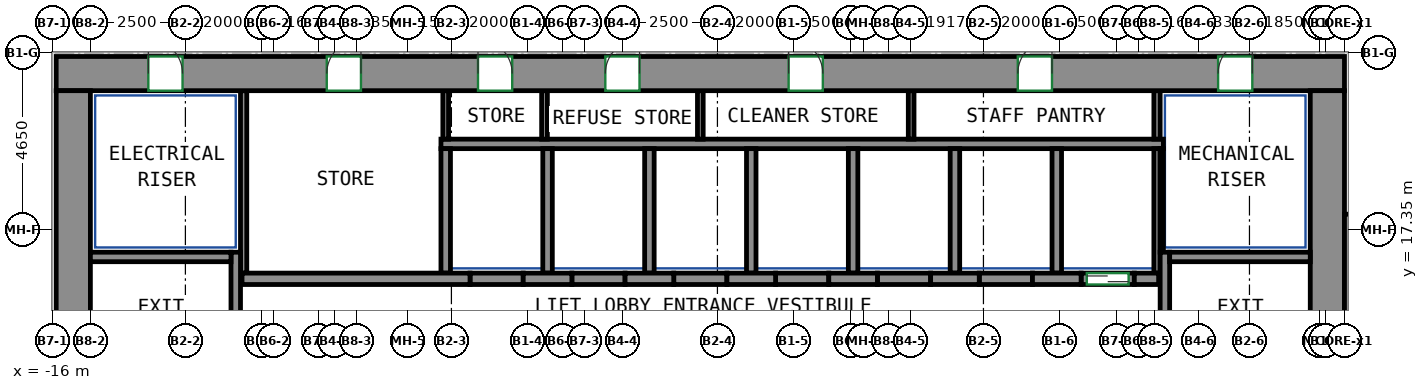
"""IFC4 building model, lengths in metres.
Left out: names, types, materials, properties, quantities, classifications, styles, units other than length and angle.
Written with IfcOpenShell. Run it as: python <this file> out.ifc"""

import sys

from ifc_helpers import new_model, si_unit, direction, frame, frame_2d, origin, place, context, subcontext, project, spatial, rectangle, extrude, source, transform, mapped, element, fill, save


model = new_model("IFC4")
c1 = context("Model", 3, precision=1e-05, world=origin(), true_north=direction((0.0, 1.0)))
c2 = subcontext(c1, "Body", "Model", "MODEL_VIEW")
j1 = project(units=[si_unit("LENGTHUNIT", "METRE"), si_unit("PLANEANGLEUNIT", "RADIAN")], contexts=[c1])
p1 = place(None, origin())
s1 = spatial("IfcSite", under=j1, at=p1, CompositionType="ELEMENT")
p2 = place(p1, origin())
s2 = spatial("IfcBuilding", under=s1, at=p2, CompositionType="ELEMENT")
p3 = place(p2, frame((0.0, 0.0, 104.6)))
s3 = spatial("IfcBuildingStorey", under=s2, at=p3, CompositionType="ELEMENT", Elevation=104.6)
m1 = source(origin(), c2, "Body", "SweptSolid", [
    extrude(rectangle(XDim=33.9, YDim=0.9, at=frame_2d((16.95, 0.0))), origin(), (0.0, 0.0, 1.0), 3.72),
])
p4 = place(p3, frame((-15.9, 21.45, 0.0), z_axis=(0.0, 0.0, 1.0), x_axis=(1.0, 0.0, 0.0)))
e1 = element("IfcWall", 1, at=p4, inside=s3, PredefinedType="SHEAR", context=c2, shape_type="MappedRepresentation", body=[
    mapped(m1, transform((0.0, 0.0, 0.0))),
])
p5 = place(p4, frame((7.12, 0.0, 0.0)))
e2 = element("IfcOpeningElement", 2, at=p5, cuts=e1, PredefinedType="OPENING", context=c2, shape_type="SweptSolid", body=[
    extrude(rectangle(XDim=0.9, YDim=2.1, at=frame_2d((0.45, 1.05))), frame((0.0, 0.46, 0.0), z_axis=(0.0, -1.0, 0.0), x_axis=(1.0, 0.0, 0.0)), (0.0, 0.0, 1.0), 0.92),
])
p6 = place(p4, frame((11.1, 0.0, 0.0)))
e3 = element("IfcOpeningElement", 3, at=p6, cuts=e1, PredefinedType="OPENING", context=c2, shape_type="SweptSolid", body=[
    extrude(rectangle(XDim=0.9, YDim=2.1, at=frame_2d((0.45, 1.05))), frame((0.0, 0.46, 0.0), z_axis=(0.0, -1.0, 0.0), x_axis=(1.0, 0.0, 0.0)), (0.0, 0.0, 1.0), 0.92),
])
p7 = place(p4, frame((14.45, 0.0, 0.0)))
e4 = element("IfcOpeningElement", 4, at=p7, cuts=e1, PredefinedType="OPENING", context=c2, shape_type="SweptSolid", body=[
    extrude(rectangle(XDim=0.9, YDim=2.1, at=frame_2d((0.45, 1.05))), frame((0.0, 0.46, 0.0), z_axis=(0.0, -1.0, 0.0), x_axis=(1.0, 0.0, 0.0)), (0.0, 0.0, 1.0), 0.92),
])
p8 = place(p4, frame((19.274, 0.0, 0.0)))
e5 = element("IfcOpeningElement", 5, at=p8, cuts=e1, PredefinedType="OPENING", context=c2, shape_type="SweptSolid", body=[
    extrude(rectangle(XDim=0.9, YDim=2.1, at=frame_2d((0.45, 1.05))), frame((0.0, 0.46, 0.0), z_axis=(0.0, -1.0, 0.0), x_axis=(1.0, 0.0, 0.0)), (0.0, 0.0, 1.0), 0.92),
])
p9 = place(p4, frame((25.304, 0.0, 0.0)))
e6 = element("IfcOpeningElement", 6, at=p9, cuts=e1, PredefinedType="OPENING", context=c2, shape_type="SweptSolid", body=[
    extrude(rectangle(XDim=0.9, YDim=2.1, at=frame_2d((0.45, 1.05))), frame((0.0, 0.46, 0.0), z_axis=(0.0, -1.0, 0.0), x_axis=(1.0, 0.0, 0.0)), (0.0, 0.0, 1.0), 0.92),
])
p10 = place(p4, frame((2.425, 0.0, 0.0)))
e7 = element("IfcOpeningElement", 7, at=p10, cuts=e1, PredefinedType="OPENING", context=c2, shape_type="SweptSolid", body=[
    extrude(rectangle(XDim=0.9, YDim=2.1, at=frame_2d((0.45, 1.05))), frame((0.0, 0.46, 0.0), z_axis=(0.0, -1.0, 0.0), x_axis=(1.0, 0.0, 0.0)), (0.0, 0.0, 1.0), 0.92),
])
p11 = place(p4, frame((30.575, 0.0, 0.0)))
e8 = element("IfcOpeningElement", 8, at=p11, cuts=e1, PredefinedType="OPENING", context=c2, shape_type="SweptSolid", body=[
    extrude(rectangle(XDim=0.9, YDim=2.1, at=frame_2d((0.45, 1.05))), frame((0.0, 0.46, 0.0), z_axis=(0.0, -1.0, 0.0), x_axis=(1.0, 0.0, 0.0)), (0.0, 0.0, 1.0), 0.92),
])
m2 = source(origin(), c2, "Body", "SweptSolid", [
    extrude(rectangle(XDim=12.0, YDim=0.9, at=frame_2d((6.0, 0.0))), origin(), (0.0, 0.0, 1.0), 3.72),
])
for number, where, z_axis, x_axis in (
    (9, (-15.45, 9.0, 0.0), (0.0, 0.0, 1.0), (0.0, 1.0, 0.0)),
    (10, (17.55, 9.0, 0.0), (0.0, 0.0, 1.0), (0.0, 1.0, 0.0)),
):
    element("IfcWall", number, at=place(p3, frame(where, z_axis=z_axis, x_axis=x_axis)), inside=s3, PredefinedType="SHEAR", context=c2, shape_type="MappedRepresentation", body=[
        mapped(m2, transform((0.0, 0.0, 0.0))),
    ])
m3 = source(origin(), c2, "Body", "SweptSolid", [
    extrude(rectangle(XDim=7.75, YDim=0.25, at=frame_2d((3.875, 0.0))), origin(), (0.0, 0.0, 1.0), 3.72),
])
p12 = place(p3, frame((-11.175, 9.0, 0.0), z_axis=(0.0, 0.0, 1.0), x_axis=(0.0, 1.0, 0.0)))
e11 = element("IfcWall", 11, at=p12, inside=s3, PredefinedType="SHEAR", context=c2, shape_type="MappedRepresentation", body=[
    mapped(m3, transform((0.0, 0.0, 0.0))),
])
m4 = source(origin(), c2, "Body", "SweptSolid", [
    extrude(rectangle(XDim=3.7, YDim=0.25, at=frame_2d((1.85, 0.0))), origin(), (0.0, 0.0, 1.0), 3.72),
])
p13 = place(p3, frame((-15.0, 16.625, 0.0), z_axis=(0.0, 0.0, 1.0), x_axis=(1.0, 0.0, 0.0)))
e12 = element("IfcWall", 12, at=p13, inside=s3, PredefinedType="SHEAR", context=c2, shape_type="MappedRepresentation", body=[
    mapped(m4, transform((0.0, 0.0, 0.0))),
])
p14 = place(p3, frame((13.275, 9.0, 0.0), z_axis=(0.0, 0.0, 1.0), x_axis=(0.0, 1.0, 0.0)))
e13 = element("IfcWall", 13, at=p14, inside=s3, PredefinedType="SHEAR", context=c2, shape_type="MappedRepresentation", body=[
    mapped(m3, transform((0.0, 0.0, 0.0))),
])
m5 = source(origin(), c2, "Body", "SweptSolid", [
    extrude(rectangle(XDim=3.7, YDim=0.25, at=frame_2d((1.85, 0.0))), origin(), (0.0, 0.0, 1.0), 3.72),
])
p15 = place(p3, frame((13.4, 16.625, 0.0), z_axis=(0.0, 0.0, 1.0), x_axis=(1.0, 0.0, 0.0)))
e14 = element("IfcWall", 14, at=p15, inside=s3, PredefinedType="SHEAR", context=c2, shape_type="MappedRepresentation", body=[
    mapped(m5, transform((0.0, 0.0, 0.0))),
])
m6 = source(origin(), c2, "Body", "SweptSolid", [
    extrude(rectangle(XDim=8.0, YDim=0.35, at=frame_2d((4.0, 0.0))), origin(), (0.0, 0.0, 1.0), 3.72),
])
p16 = place(p3, frame((18.175, 9.75, 0.0), z_axis=(0.0, 0.0, 1.0), x_axis=(0.0, 1.0, 0.0)))
e15 = element("IfcWall", 15, at=p16, inside=s3, PredefinedType="SHEAR", context=c2, shape_type="MappedRepresentation", body=[
    mapped(m6, transform((0.0, 0.0, 0.0))),
])
m7 = source(origin(), c2, "Body", "SweptSolid", [
    extrude(rectangle(XDim=6.0, YDim=0.3, at=frame_2d((3.0, 0.0))), origin(), (0.0, 0.0, 1.0), 3.72),
])
p17 = place(p3, frame((-11.01, 16.05, 0.0), z_axis=(0.0, 0.0, 1.0), x_axis=(1.0, 0.0, 0.0)))
e16 = element("IfcWall", 16, at=p17, inside=s3, PredefinedType="SHEAR", context=c2, shape_type="MappedRepresentation", body=[
    mapped(m7, transform((0.0, 0.0, 0.0))),
])
m8 = source(origin(), c2, "Body", "SweptSolid", [
    extrude(rectangle(XDim=1.28, YDim=0.3, at=frame_2d((0.64, 0.0))), origin(), (0.0, 0.0, 1.0), 3.72),
])
for number, where, z_axis, x_axis in (
    (17, (-3.61, 16.05, 0.0), (0.0, 0.0, 1.0), (1.0, 0.0, 0.0)),
    (18, (-0.93, 16.05, 0.0), (0.0, 0.0, 1.0), (1.0, 0.0, 0.0)),
    (19, (1.75, 16.05, 0.0), (0.0, 0.0, 1.0), (1.0, 0.0, 0.0)),
    (20, (4.43, 16.05, 0.0), (0.0, 0.0, 1.0), (1.0, 0.0, 0.0)),
):
    element("IfcWall", number, at=place(p3, frame(where, z_axis=z_axis, x_axis=x_axis)), inside=s3, PredefinedType="SHEAR", context=c2, shape_type="MappedRepresentation", body=[
        mapped(m8, transform((0.0, 0.0, 0.0))),
    ])
m9 = source(origin(), c2, "Body", "SweptSolid", [
    extrude(rectangle(XDim=1.28, YDim=0.3, at=frame_2d((0.64, 0.0))), origin(), (0.0, 0.0, 1.0), 3.72),
])
p18 = place(p3, frame((7.11, 16.05, 0.0), z_axis=(0.0, 0.0, 1.0), x_axis=(1.0, 0.0, 0.0)))
e21 = element("IfcWall", 21, at=p18, inside=s3, PredefinedType="SHEAR", context=c2, shape_type="MappedRepresentation", body=[
    mapped(m9, transform((0.0, 0.0, 0.0))),
])
p19 = place(p3, frame((9.79, 16.05, 0.0), z_axis=(0.0, 0.0, 1.0), x_axis=(1.0, 0.0, 0.0)))
e22 = element("IfcWall", 22, at=p19, inside=s3, PredefinedType="SHEAR", context=c2, shape_type="MappedRepresentation", body=[
    mapped(m8, transform((0.0, 0.0, 0.0))),
])
m10 = source(origin(), c2, "Body", "SweptSolid", [
    extrude(rectangle(XDim=0.64, YDim=0.3, at=frame_2d((0.32, 0.0))), origin(), (0.0, 0.0, 1.0), 3.72),
])
p20 = place(p3, frame((12.47, 16.05, 0.0), z_axis=(0.0, 0.0, 1.0), x_axis=(1.0, 0.0, 0.0)))
e23 = element("IfcWall", 23, at=p20, inside=s3, PredefinedType="SHEAR", context=c2, shape_type="MappedRepresentation", body=[
    mapped(m10, transform((0.0, 0.0, 0.0))),
])
m11 = source(origin(), c2, "Body", "SweptSolid", [
    extrude(rectangle(XDim=1.4, YDim=0.3, at=frame_2d((0.7, 0.0))), origin(), (0.0, 0.0, 1.0), 3.72),
])
p21 = place(p3, frame((11.07, 16.05, 0.0), z_axis=(0.0, 0.0, 1.0), x_axis=(1.0, 0.0, 0.0)))
e24 = element("IfcWall", 24, at=p21, inside=s3, PredefinedType="PARTITIONING", context=c2, shape_type="MappedRepresentation", body=[
    mapped(m11, transform((0.0, 0.0, 0.0))),
])
p22 = place(p21, frame((0.15, 0.0, 0.0)))
e25 = element("IfcOpeningElement", 25, at=p22, cuts=e24, PredefinedType="OPENING", context=c2, shape_type="SweptSolid", body=[
    extrude(rectangle(XDim=1.1, YDim=2.1, at=frame_2d((0.55, 1.05))), frame((0.0, 0.16, 0.0), z_axis=(0.0, -1.0, 0.0), x_axis=(1.0, 0.0, 0.0)), (0.0, 0.0, 1.0), 0.32),
])
p23 = place(p3, frame((-5.01, 16.05, 0.0), z_axis=(0.0, 0.0, 1.0), x_axis=(1.0, 0.0, 0.0)))
e26 = element("IfcWall", 26, at=p23, inside=s3, PredefinedType="PARTITIONING", context=c2, shape_type="MappedRepresentation", body=[
    mapped(m11, transform((0.0, 0.0, 0.0))),
])
m12 = source(origin(), c2, "Body", "SweptSolid", [
    extrude(rectangle(XDim=1.4, YDim=0.3, at=frame_2d((0.7, 0.0))), origin(), (0.0, 0.0, 1.0), 3.72),
])
p24 = place(p3, frame((-2.33, 16.05, 0.0), z_axis=(0.0, 0.0, 1.0), x_axis=(1.0, 0.0, 0.0)))
e27 = element("IfcWall", 27, at=p24, inside=s3, PredefinedType="PARTITIONING", context=c2, shape_type="MappedRepresentation", body=[
    mapped(m12, transform((0.0, 0.0, 0.0))),
])
for number, where, z_axis, x_axis in (
    (28, (0.35, 16.05, 0.0), (0.0, 0.0, 1.0), (1.0, 0.0, 0.0)),
    (29, (3.03, 16.05, 0.0), (0.0, 0.0, 1.0), (1.0, 0.0, 0.0)),
):
    element("IfcWall", number, at=place(p3, frame(where, z_axis=z_axis, x_axis=x_axis)), inside=s3, PredefinedType="PARTITIONING", context=c2, shape_type="MappedRepresentation", body=[
        mapped(m11, transform((0.0, 0.0, 0.0))),
    ])
for number, where, z_axis, x_axis in (
    (30, (5.71, 16.05, 0.0), (0.0, 0.0, 1.0), (1.0, 0.0, 0.0)),
    (31, (8.39, 16.05, 0.0), (0.0, 0.0, 1.0), (1.0, 0.0, 0.0)),
):
    element("IfcWall", number, at=place(p3, frame(where, z_axis=z_axis, x_axis=x_axis)), inside=s3, PredefinedType="PARTITIONING", context=c2, shape_type="MappedRepresentation", body=[
        mapped(m12, transform((0.0, 0.0, 0.0))),
    ])
m13 = source(origin(), c2, "Body", "SweptSolid", [
    extrude(rectangle(XDim=19.01, YDim=0.25, at=frame_2d((9.505, 0.0))), origin(), (0.0, 0.0, 1.0), 3.72),
])
p25 = place(p3, frame((-5.775, 19.6, 0.0), z_axis=(0.0, 0.0, 1.0), x_axis=(1.0, 0.0, 0.0)))
e32 = element("IfcWall", 32, at=p25, inside=s3, PredefinedType="PARTITIONING", context=c2, shape_type="MappedRepresentation", body=[
    mapped(m13, transform((0.0, 0.0, 0.0))),
])
m14 = source(origin(), c2, "Body", "SweptSolid", [
    extrude(rectangle(XDim=3.275, YDim=0.165, at=frame_2d((1.638, 0.0))), origin(), (0.0, 0.0, 1.0), 3.72),
])
p26 = place(p3, frame((13.067, 16.2, 0.0), z_axis=(0.0, 0.0, 1.0), x_axis=(0.0, 1.0, 0.0)))
e33 = element("IfcWall", 33, at=p26, inside=s3, PredefinedType="PARTITIONING", context=c2, shape_type="MappedRepresentation", body=[
    mapped(m14, transform((0.0, 0.0, 0.0))),
])
m15 = source(origin(), c2, "Body", "SweptSolid", [
    extrude(rectangle(XDim=1.275, YDim=0.165, at=frame_2d((0.637, 0.0))), origin(), (0.0, 0.0, 1.0), 3.72),
])
p27 = place(p3, frame((13.067, 19.725, 0.0), z_axis=(0.0, 0.0, 1.0), x_axis=(0.0, 1.0, 0.0)))
e34 = element("IfcWall", 34, at=p27, inside=s3, PredefinedType="PARTITIONING", context=c2, shape_type="MappedRepresentation", body=[
    mapped(m15, transform((0.0, 0.0, 0.0))),
])
m16 = source(origin(), c2, "Body", "SweptSolid", [
    extrude(rectangle(XDim=4.8, YDim=0.165, at=frame_2d((2.4, 0.0))), origin(), (0.0, 0.0, 1.0), 3.72),
])
p28 = place(p3, frame((-10.968, 16.2, 0.0), z_axis=(0.0, 0.0, 1.0), x_axis=(0.0, 1.0, 0.0)))
e35 = element("IfcWall", 35, at=p28, inside=s3, PredefinedType="PARTITIONING", context=c2, shape_type="MappedRepresentation", body=[
    mapped(m16, transform((0.0, 0.0, 0.0))),
])
m17 = source(origin(), c2, "Body", "SweptSolid", [
    extrude(rectangle(XDim=3.275, YDim=0.25, at=frame_2d((1.638, 0.0))), origin(), (0.0, 0.0, 1.0), 3.72),
])
p29 = place(p3, frame((10.43, 16.2, 0.0), z_axis=(0.0, 0.0, 1.0), x_axis=(0.0, 1.0, 0.0)))
e36 = element("IfcWall", 36, at=p29, inside=s3, PredefinedType="PARTITIONING", context=c2, shape_type="MappedRepresentation", body=[
    mapped(m17, transform((0.0, 0.0, 0.0))),
])
m18 = source(origin(), c2, "Body", "SweptSolid", [
    extrude(rectangle(XDim=2.725, YDim=0.085, at=frame_2d((1.363, 0.0))), origin(), (0.0, 0.0, 1.0), 3.72),
])
p30 = place(p3, frame((13.192, 16.75, 0.0), z_axis=(0.0, 0.0, 1.0), x_axis=(0.0, 1.0, 0.0)))
e37 = element("IfcWall", 37, at=p30, inside=s3, PredefinedType="PARTITIONING", context=c2, shape_type="MappedRepresentation", body=[
    mapped(m18, transform((0.0, 0.0, 0.0))),
])
for number, where, z_axis, x_axis in (
    (38, (2.39, 16.2, 0.0), (0.0, 0.0, 1.0), (0.0, 1.0, 0.0)),
    (39, (5.07, 16.2, 0.0), (0.0, 0.0, 1.0), (0.0, 1.0, 0.0)),
    (40, (7.75, 16.2, 0.0), (0.0, 0.0, 1.0), (0.0, 1.0, 0.0)),
    (41, (-0.29, 16.2, 0.0), (0.0, 0.0, 1.0), (0.0, 1.0, 0.0)),
    (42, (-2.97, 16.2, 0.0), (0.0, 0.0, 1.0), (0.0, 1.0, 0.0)),
    (43, (-5.65, 16.2, 0.0), (0.0, 0.0, 1.0), (0.0, 1.0, 0.0)),
):
    element("IfcWall", number, at=place(p3, frame(where, z_axis=z_axis, x_axis=x_axis)), inside=s3, PredefinedType="PARTITIONING", context=c2, shape_type="MappedRepresentation", body=[
        mapped(m17, transform((0.0, 0.0, 0.0))),
    ])
m19 = source(origin(), c2, "Body", "SweptSolid", [
    extrude(rectangle(XDim=1.275, YDim=0.15, at=frame_2d((0.637, 0.0))), origin(), (0.0, 0.0, 1.0), 3.72),
])
for number, where, z_axis, x_axis in (
    (44, (-5.65, 19.725, 0.0), (0.0, 0.0, 1.0), (0.0, 1.0, 0.0)),
    (45, (-3.05, 19.725, 0.0), (0.0, 0.0, 1.0), (0.0, 1.0, 0.0)),
    (46, (1.05, 19.725, 0.0), (0.0, 0.0, 1.0), (0.0, 1.0, 0.0)),
    (47, (6.598, 19.725, 0.0), (0.0, 0.0, 1.0), (0.0, 1.0, 0.0)),
):
    element("IfcWall", number, at=place(p3, frame(where, z_axis=z_axis, x_axis=x_axis)), inside=s3, PredefinedType="PARTITIONING", context=c2, shape_type="MappedRepresentation", body=[
        mapped(m19, transform((0.0, 0.0, 0.0))),
    ])
p31 = place(p22, origin())
e48 = element("IfcDoor", 48, at=p31, inside=s3, OperationType="DOUBLE_DOOR_SLIDING", PredefinedType="DOOR", context=c2, shape_type="SweptSolid", body=[
    extrude(rectangle(XDim=1.1, YDim=2.1, at=frame_2d((0.55, 1.05))), frame((0.0, 0.025, 0.0), z_axis=(0.0, -1.0, 0.0), x_axis=(1.0, 0.0, 0.0)), (0.0, 0.0, 1.0), 0.05),
])
fill(e25, e48)
p32 = place(p5, origin())
e49 = element("IfcDoor", 49, at=p32, inside=s3, OperationType="SINGLE_SWING_RIGHT", PredefinedType="DOOR", context=c2, shape_type="SweptSolid", body=[
    extrude(rectangle(XDim=0.9, YDim=2.1, at=frame_2d((0.45, 1.05))), frame((0.0, -0.305, 0.0), z_axis=(0.0, -1.0, 0.0), x_axis=(1.0, 0.0, 0.0)), (0.0, 0.0, 1.0), 0.05),
])
fill(e2, e49)
p33 = place(p6, origin())
e50 = element("IfcDoor", 50, at=p33, inside=s3, OperationType="SINGLE_SWING_LEFT", PredefinedType="DOOR", context=c2, shape_type="SweptSolid", body=[
    extrude(rectangle(XDim=0.9, YDim=2.1, at=frame_2d((0.45, 1.05))), frame((0.0, -0.305, 0.0), z_axis=(0.0, -1.0, 0.0), x_axis=(1.0, 0.0, 0.0)), (0.0, 0.0, 1.0), 0.05),
])
fill(e3, e50)
p34 = place(p7, origin())
e51 = element("IfcDoor", 51, at=p34, inside=s3, OperationType="SINGLE_SWING_RIGHT", PredefinedType="DOOR", context=c2, shape_type="SweptSolid", body=[
    extrude(rectangle(XDim=0.9, YDim=2.1, at=frame_2d((0.45, 1.05))), frame((0.0, -0.305, 0.0), z_axis=(0.0, -1.0, 0.0), x_axis=(1.0, 0.0, 0.0)), (0.0, 0.0, 1.0), 0.05),
])
fill(e4, e51)
p35 = place(p8, origin())
e52 = element("IfcDoor", 52, at=p35, inside=s3, OperationType="SINGLE_SWING_LEFT", PredefinedType="DOOR", context=c2, shape_type="SweptSolid", body=[
    extrude(rectangle(XDim=0.9, YDim=2.1, at=frame_2d((0.45, 1.05))), frame((0.0, -0.305, 0.0), z_axis=(0.0, -1.0, 0.0), x_axis=(1.0, 0.0, 0.0)), (0.0, 0.0, 1.0), 0.05),
])
fill(e5, e52)
p36 = place(p9, origin())
e53 = element("IfcDoor", 53, at=p36, inside=s3, OperationType="SINGLE_SWING_RIGHT", PredefinedType="DOOR", context=c2, shape_type="SweptSolid", body=[
    extrude(rectangle(XDim=0.9, YDim=2.1, at=frame_2d((0.45, 1.05))), frame((0.0, -0.305, 0.0), z_axis=(0.0, -1.0, 0.0), x_axis=(1.0, 0.0, 0.0)), (0.0, 0.0, 1.0), 0.05),
])
fill(e6, e53)
p37 = place(p10, origin())
e54 = element("IfcDoor", 54, at=p37, inside=s3, OperationType="SINGLE_SWING_LEFT", PredefinedType="DOOR", context=c2, shape_type="SweptSolid", body=[
    extrude(rectangle(XDim=0.9, YDim=2.1, at=frame_2d((0.45, 1.05))), frame((0.0, -0.305, 0.0), z_axis=(0.0, -1.0, 0.0), x_axis=(1.0, 0.0, 0.0)), (0.0, 0.0, 1.0), 0.05),
])
fill(e7, e54)
p38 = place(p11, origin())
e55 = element("IfcDoor", 55, at=p38, inside=s3, OperationType="SINGLE_SWING_RIGHT", PredefinedType="DOOR", context=c2, shape_type="SweptSolid", body=[
    extrude(rectangle(XDim=0.9, YDim=2.1, at=frame_2d((0.45, 1.05))), frame((0.0, -0.305, 0.0), z_axis=(0.0, -1.0, 0.0), x_axis=(1.0, 0.0, 0.0)), (0.0, 0.0, 1.0), 0.05),
])
fill(e8, e55)
save(model, sys.argv[1])
